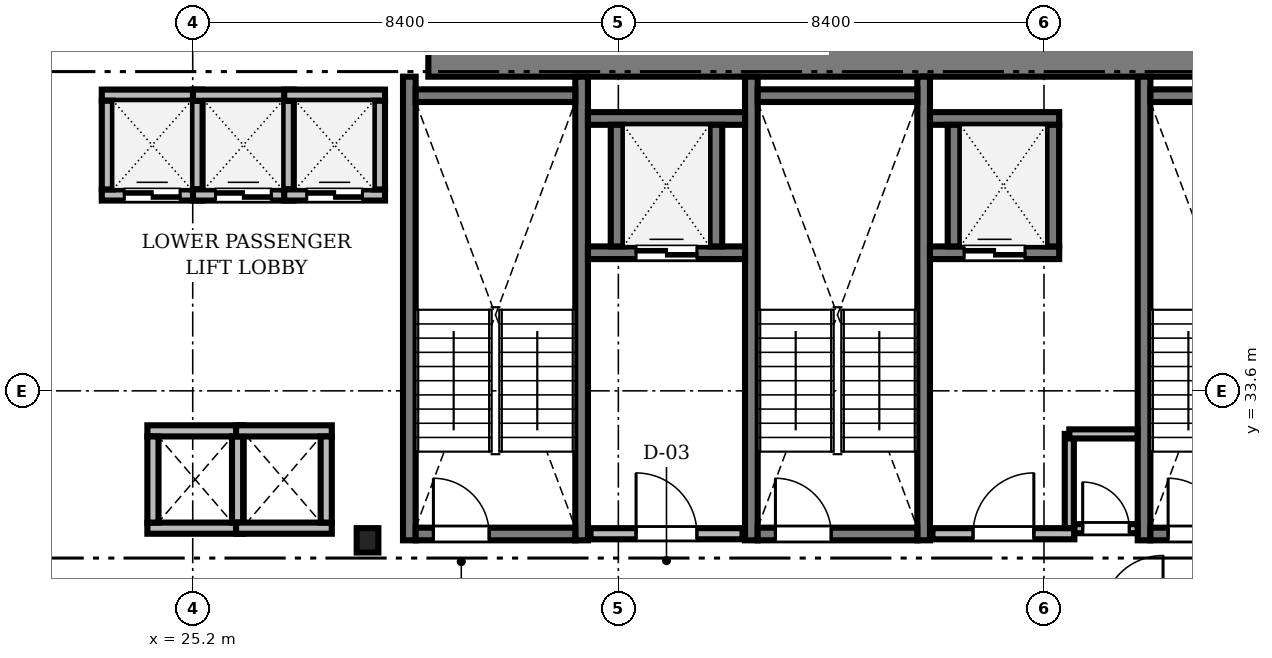
"""IFC4 building model, lengths in metres.
Left out: names, types, materials, properties, quantities, classifications, styles, units other than length and angle.
Written with IfcOpenShell. Run it as: python <this file> out.ifc"""

import sys

from ifc_helpers import new_model, si_unit, direction, frame, frame_2d, origin, origin_2d, place, context, subcontext, project, spatial, rectangle, i_section, extrude, source, transform, mapped, element, fill, save


model = new_model("IFC4")
c1 = context("Model", 3, precision=1e-05, world=origin(), true_north=direction((0.0, 1.0)))
c2 = subcontext(c1, "Body", "Model", "MODEL_VIEW")
j1 = project(units=[si_unit("LENGTHUNIT", "METRE"), si_unit("PLANEANGLEUNIT", "RADIAN")], contexts=[c1])
p1 = place(None, origin())
s1 = spatial("IfcSite", under=j1, at=p1, CompositionType="ELEMENT")
p2 = place(p1, origin())
s2 = spatial("IfcBuilding", under=s1, at=p2, CompositionType="ELEMENT")
p3 = place(p2, frame((0.0, 0.0, 34.9)))
s3 = spatial("IfcBuildingStorey", under=s2, at=p3, CompositionType="ELEMENT", Elevation=34.9)
m1 = source(origin(), c2, "Body", "SweptSolid", [
    extrude(rectangle(XDim=17.52, YDim=1.0, at=frame_2d((8.76, 0.0))), origin(), (0.0, 0.0, 1.0), 3.41),
])
p4 = place(p3, frame((29.85, 40.3, 0.0), z_axis=(0.0, 0.0, 1.0), x_axis=(1.0, 0.0, 0.0)))
e1 = element("IfcWall", 1, at=p4, inside=s3, PredefinedType="SHEAR", context=c2, shape_type="MappedRepresentation", body=[
    mapped(m1, transform((0.0, 0.0, 0.0), scale=1.0)),
])
m2 = source(origin(), c2, "Body", "SweptSolid", [
    extrude(i_section(OverallWidth=0.428, OverallDepth=0.481, WebThickness=0.04, FlangeThickness=0.063, FilletRadius=0.015, at=origin_2d()), origin(), (0.0, 0.0, 1.0), 3.41),
])
p5 = place(p3, frame((28.65, 30.65, 0.0), z_axis=(0.0, 0.0, 1.0), x_axis=(1.0, 0.0, 0.0)))
e2 = element("IfcColumn", 2, at=p5, inside=s3, PredefinedType="COLUMN", context=c2, shape_type="MappedRepresentation", body=[
    mapped(m2, transform((0.0, 0.0, 0.0), scale=1.0)),
])
m3 = source(origin(), c2, "Body", "SweptSolid", [
    extrude(rectangle(XDim=9.15, YDim=0.25, at=frame_2d((4.575, 0.0))), origin(), (0.0, 0.0, 1.0), 3.45),
])
for number, where, z_axis, x_axis in (
    (3, (29.475, 30.65, 0.0), (0.0, 0.0, 1.0), (0.0, 1.0, 0.0)),
    (4, (32.875, 30.65, 0.0), (0.0, 0.0, 1.0), (0.0, 1.0, 0.0)),
):
    element("IfcWall", number, at=place(p3, frame(where, z_axis=z_axis, x_axis=x_axis)), inside=s3, PredefinedType="SOLIDWALL", context=c2, shape_type="MappedRepresentation", body=[
        mapped(m3, transform((0.0, 0.0, 0.0), scale=1.0)),
    ])
m4 = source(origin(), c2, "Body", "SweptSolid", [
    extrude(rectangle(XDim=3.15, YDim=0.25, at=frame_2d((1.575, 0.0))), origin(), (0.0, 0.0, 1.0), 3.45),
])
p6 = place(p3, frame((29.6, 39.425, 0.0), z_axis=(0.0, 0.0, 1.0), x_axis=(1.0, 0.0, 0.0)))
e5 = element("IfcWall", 5, at=p6, inside=s3, PredefinedType="SOLIDWALL", context=c2, shape_type="MappedRepresentation", body=[
    mapped(m4, transform((0.0, 0.0, 0.0), scale=1.0)),
])
p7 = place(p3, frame((29.6, 30.775, 0.0), z_axis=(0.0, 0.0, 1.0), x_axis=(1.0, 0.0, 0.0)))
e6 = element("IfcWall", 6, at=p7, inside=s3, PredefinedType="SOLIDWALL", context=c2, shape_type="MappedRepresentation", body=[
    mapped(m4, transform((0.0, 0.0, 0.0), scale=1.0)),
])
m5 = source(origin(), c2, "Body", "SweptSolid", [
    extrude(rectangle(XDim=1.1, YDim=2.2, at=frame_2d((0.55, 1.1))), frame((0.0, 0.135, 0.0), z_axis=(0.0, -1.0, 0.0), x_axis=(1.0, 0.0, 0.0)), (0.0, 0.0, 1.0), 0.27),
])
p8 = place(p7, frame((0.35, 0.0, 0.0)))
e7 = element("IfcOpeningElement", 7, at=p8, cuts=e6, PredefinedType="OPENING", context=c2, shape_type="MappedRepresentation", body=[
    mapped(m5, transform((0.0, 0.0, 0.0), scale=1.0)),
])
for number, where, z_axis, x_axis in (
    (8, (36.225, 30.65, 0.0), (0.0, 0.0, 1.0), (0.0, 1.0, 0.0)),
    (9, (39.625, 30.65, 0.0), (0.0, 0.0, 1.0), (0.0, 1.0, 0.0)),
):
    element("IfcWall", number, at=place(p3, frame(where, z_axis=z_axis, x_axis=x_axis)), inside=s3, PredefinedType="SOLIDWALL", context=c2, shape_type="MappedRepresentation", body=[
        mapped(m3, transform((0.0, 0.0, 0.0), scale=1.0)),
    ])
p9 = place(p3, frame((36.35, 39.425, 0.0), z_axis=(0.0, 0.0, 1.0), x_axis=(1.0, 0.0, 0.0)))
e10 = element("IfcWall", 10, at=p9, inside=s3, PredefinedType="SOLIDWALL", context=c2, shape_type="MappedRepresentation", body=[
    mapped(m4, transform((0.0, 0.0, 0.0), scale=1.0)),
])
p10 = place(p3, frame((36.35, 30.775, 0.0), z_axis=(0.0, 0.0, 1.0), x_axis=(1.0, 0.0, 0.0)))
e11 = element("IfcWall", 11, at=p10, inside=s3, PredefinedType="SOLIDWALL", context=c2, shape_type="MappedRepresentation", body=[
    mapped(m4, transform((0.0, 0.0, 0.0), scale=1.0)),
])
p11 = place(p10, frame((0.35, 0.0, 0.0)))
e12 = element("IfcOpeningElement", 12, at=p11, cuts=e11, PredefinedType="OPENING", context=c2, shape_type="MappedRepresentation", body=[
    mapped(m5, transform((0.0, 0.0, 0.0), scale=1.0)),
])
p12 = place(p3, frame((43.975, 30.65, 0.0), z_axis=(0.0, 0.0, 1.0), x_axis=(0.0, 1.0, 0.0)))
e13 = element("IfcWall", 13, at=p12, inside=s3, PredefinedType="SOLIDWALL", context=c2, shape_type="MappedRepresentation", body=[
    mapped(m3, transform((0.0, 0.0, 0.0), scale=1.0)),
])
p13 = place(p3, frame((44.1, 39.425, 0.0), z_axis=(0.0, 0.0, 1.0), x_axis=(1.0, 0.0, 0.0)))
e14 = element("IfcWall", 14, at=p13, inside=s3, PredefinedType="SOLIDWALL", context=c2, shape_type="MappedRepresentation", body=[
    mapped(m4, transform((0.0, 0.0, 0.0), scale=1.0)),
])
p14 = place(p3, frame((44.1, 30.775, 0.0), z_axis=(0.0, 0.0, 1.0), x_axis=(1.0, 0.0, 0.0)))
e15 = element("IfcWall", 15, at=p14, inside=s3, PredefinedType="SOLIDWALL", context=c2, shape_type="MappedRepresentation", body=[
    mapped(m4, transform((0.0, 0.0, 0.0), scale=1.0)),
])
p15 = place(p14, frame((0.35, 0.0, 0.0)))
e16 = element("IfcOpeningElement", 16, at=p15, cuts=e15, PredefinedType="OPENING", context=c2, shape_type="MappedRepresentation", body=[
    mapped(m5, transform((0.0, 0.0, 0.0), scale=1.0)),
])
m6 = source(origin(), c2, "Body", "SweptSolid", [
    extrude(rectangle(XDim=3.0, YDim=0.22, at=frame_2d((1.5, 0.0))), origin(), (0.0, 0.0, 1.0), 3.41),
])
p16 = place(p3, frame((33.05, 30.78, 0.0), z_axis=(0.0, 0.0, 1.0), x_axis=(1.0, 0.0, 0.0)))
e17 = element("IfcWall", 17, at=p16, inside=s3, PredefinedType="SOLIDWALL", context=c2, shape_type="MappedRepresentation", body=[
    mapped(m6, transform((0.0, 0.0, 0.0), scale=1.0)),
])
m7 = source(origin(), c2, "Body", "SweptSolid", [
    extrude(rectangle(XDim=1.2, YDim=2.2, at=frame_2d((0.6, 1.1))), frame((0.0, 0.12, 0.0), z_axis=(0.0, -1.0, 0.0), x_axis=(1.0, 0.0, 0.0)), (0.0, 0.0, 1.0), 0.24),
])
p17 = place(p16, frame((0.9, 0.0, 0.0)))
e18 = element("IfcOpeningElement", 18, at=p17, cuts=e17, PredefinedType="OPENING", context=c2, shape_type="MappedRepresentation", body=[
    mapped(m7, transform((0.0, 0.0, 0.0), scale=1.0)),
])
m8 = source(origin(), c2, "Body", "SweptSolid", [
    extrude(rectangle(XDim=2.8, YDim=0.22, at=frame_2d((1.4, 0.0))), origin(), (0.0, 0.0, 1.0), 3.41),
])
p18 = place(p3, frame((39.8, 30.78, 0.0), z_axis=(0.0, 0.0, 1.0), x_axis=(1.0, 0.0, 0.0)))
e19 = element("IfcWall", 19, at=p18, inside=s3, PredefinedType="SOLIDWALL", context=c2, shape_type="MappedRepresentation", body=[
    mapped(m8, transform((0.0, 0.0, 0.0), scale=1.0)),
])
p19 = place(p18, frame((0.8, 0.0, 0.0)))
e20 = element("IfcOpeningElement", 20, at=p19, cuts=e19, PredefinedType="OPENING", context=c2, shape_type="MappedRepresentation", body=[
    mapped(m7, transform((0.0, 0.0, 0.0), scale=1.0)),
])
m9 = source(origin(), c2, "Body", "SweptSolid", [
    extrude(rectangle(XDim=1.99, YDim=0.22, at=frame_2d((0.995, 0.0))), origin(), (0.0, 0.0, 1.0), 3.41),
])
p20 = place(p3, frame((23.405, 37.465, 0.0), z_axis=(0.0, 0.0, 1.0), x_axis=(1.0, 0.0, 0.0)))
e21 = element("IfcWall", 21, at=p20, inside=s3, PredefinedType="SOLIDWALL", context=c2, shape_type="MappedRepresentation", body=[
    mapped(m9, transform((0.0, 0.0, 0.0), scale=1.0)),
])
m10 = source(origin(), c2, "Body", "SweptSolid", [
    extrude(rectangle(XDim=1.1, YDim=2.2, at=frame_2d((0.55, 1.1))), frame((0.0, 0.12, 0.0), z_axis=(0.0, -1.0, 0.0), x_axis=(1.0, 0.0, 0.0)), (0.0, 0.0, 1.0), 0.24),
])
p21 = place(p20, frame((0.445, 0.0, 0.0)))
e22 = element("IfcOpeningElement", 22, at=p21, cuts=e21, PredefinedType="OPENING", context=c2, shape_type="MappedRepresentation", body=[
    mapped(m10, transform((0.0, 0.0, 0.0), scale=1.0)),
])
p22 = place(p3, frame((23.405, 39.435, 0.0), z_axis=(0.0, 0.0, 1.0), x_axis=(1.0, 0.0, 0.0)))
e23 = element("IfcWall", 23, at=p22, inside=s3, PredefinedType="SOLIDWALL", context=c2, shape_type="MappedRepresentation", body=[
    mapped(m9, transform((0.0, 0.0, 0.0), scale=1.0)),
])
m11 = source(origin(), c2, "Body", "SweptSolid", [
    extrude(rectangle(XDim=1.75, YDim=0.22, at=frame_2d((0.875, 0.0))), origin(), (0.0, 0.0, 1.0), 3.41),
])
for number, where, z_axis, x_axis in (
    (24, (23.515, 37.575, 0.0), (0.0, 0.0, 1.0), (0.0, 1.0, 0.0)),
    (25, (25.285, 37.575, 0.0), (0.0, 0.0, 1.0), (0.0, 1.0, 0.0)),
):
    element("IfcWall", number, at=place(p3, frame(where, z_axis=z_axis, x_axis=x_axis)), inside=s3, PredefinedType="SOLIDWALL", context=c2, shape_type="MappedRepresentation", body=[
        mapped(m11, transform((0.0, 0.0, 0.0), scale=1.0)),
    ])
p23 = place(p3, frame((25.205, 37.465, 0.0), z_axis=(0.0, 0.0, 1.0), x_axis=(1.0, 0.0, 0.0)))
e26 = element("IfcWall", 26, at=p23, inside=s3, PredefinedType="SOLIDWALL", context=c2, shape_type="MappedRepresentation", body=[
    mapped(m9, transform((0.0, 0.0, 0.0), scale=1.0)),
])
p24 = place(p23, frame((0.445, 0.0, 0.0)))
e27 = element("IfcOpeningElement", 27, at=p24, cuts=e26, PredefinedType="OPENING", context=c2, shape_type="MappedRepresentation", body=[
    mapped(m10, transform((0.0, 0.0, 0.0), scale=1.0)),
])
p25 = place(p3, frame((25.205, 39.435, 0.0), z_axis=(0.0, 0.0, 1.0), x_axis=(1.0, 0.0, 0.0)))
e28 = element("IfcWall", 28, at=p25, inside=s3, PredefinedType="SOLIDWALL", context=c2, shape_type="MappedRepresentation", body=[
    mapped(m9, transform((0.0, 0.0, 0.0), scale=1.0)),
])
p26 = place(p3, frame((27.085, 37.575, 0.0), z_axis=(0.0, 0.0, 1.0), x_axis=(0.0, 1.0, 0.0)))
e29 = element("IfcWall", 29, at=p26, inside=s3, PredefinedType="SOLIDWALL", context=c2, shape_type="MappedRepresentation", body=[
    mapped(m11, transform((0.0, 0.0, 0.0), scale=1.0)),
])
m12 = source(origin(), c2, "Body", "SweptSolid", [
    extrude(rectangle(XDim=1.99, YDim=0.22, at=frame_2d((0.995, 0.0))), origin(), (0.0, 0.0, 1.0), 3.41),
])
p27 = place(p3, frame((27.005, 37.465, 0.0), z_axis=(0.0, 0.0, 1.0), x_axis=(1.0, 0.0, 0.0)))
e30 = element("IfcWall", 30, at=p27, inside=s3, PredefinedType="SOLIDWALL", context=c2, shape_type="MappedRepresentation", body=[
    mapped(m12, transform((0.0, 0.0, 0.0), scale=1.0)),
])
p28 = place(p27, frame((0.445, 0.0, 0.0)))
e31 = element("IfcOpeningElement", 31, at=p28, cuts=e30, PredefinedType="OPENING", context=c2, shape_type="MappedRepresentation", body=[
    mapped(m10, transform((0.0, 0.0, 0.0), scale=1.0)),
])
p29 = place(p3, frame((27.005, 39.435, 0.0), z_axis=(0.0, 0.0, 1.0), x_axis=(1.0, 0.0, 0.0)))
e32 = element("IfcWall", 32, at=p29, inside=s3, PredefinedType="SOLIDWALL", context=c2, shape_type="MappedRepresentation", body=[
    mapped(m12, transform((0.0, 0.0, 0.0), scale=1.0)),
])
p30 = place(p3, frame((28.885, 37.575, 0.0), z_axis=(0.0, 0.0, 1.0), x_axis=(0.0, 1.0, 0.0)))
e33 = element("IfcWall", 33, at=p30, inside=s3, PredefinedType="SOLIDWALL", context=c2, shape_type="MappedRepresentation", body=[
    mapped(m11, transform((0.0, 0.0, 0.0), scale=1.0)),
])
m13 = source(origin(), c2, "Body", "SweptSolid", [
    extrude(rectangle(XDim=3.1, YDim=0.25, at=frame_2d((1.55, 0.0))), origin(), (0.0, 0.0, 1.0), 3.41),
])
p31 = place(p3, frame((33.0, 36.325, 0.0), z_axis=(0.0, 0.0, 1.0), x_axis=(1.0, 0.0, 0.0)))
e34 = element("IfcWall", 34, at=p31, inside=s3, PredefinedType="SOLIDWALL", context=c2, shape_type="MappedRepresentation", body=[
    mapped(m13, transform((0.0, 0.0, 0.0), scale=1.0)),
])
m14 = source(origin(), c2, "Body", "SweptSolid", [
    extrude(rectangle(XDim=1.2, YDim=2.25, at=frame_2d((0.6, 1.125))), frame((0.0, 0.135, 0.0), z_axis=(0.0, -1.0, 0.0), x_axis=(1.0, 0.0, 0.0)), (0.0, 0.0, 1.0), 0.27),
])
p32 = place(p31, frame((0.95, 0.0, 0.0)))
e35 = element("IfcOpeningElement", 35, at=p32, cuts=e34, PredefinedType="OPENING", context=c2, shape_type="MappedRepresentation", body=[
    mapped(m14, transform((0.0, 0.0, 0.0), scale=1.0)),
])
p33 = place(p3, frame((33.0, 38.975, 0.0), z_axis=(0.0, 0.0, 1.0), x_axis=(1.0, 0.0, 0.0)))
e36 = element("IfcWall", 36, at=p33, inside=s3, PredefinedType="SOLIDWALL", context=c2, shape_type="MappedRepresentation", body=[
    mapped(m13, transform((0.0, 0.0, 0.0), scale=1.0)),
])
m15 = source(origin(), c2, "Body", "SweptSolid", [
    extrude(rectangle(XDim=2.4, YDim=0.25, at=frame_2d((1.2, 0.0))), origin(), (0.0, 0.0, 1.0), 3.41),
])
for number, where, z_axis, x_axis in (
    (37, (33.575, 36.45, 0.0), (0.0, 0.0, 1.0), (0.0, 1.0, 0.0)),
    (38, (35.525, 36.45, 0.0), (0.0, 0.0, 1.0), (0.0, 1.0, 0.0)),
):
    element("IfcWall", number, at=place(p3, frame(where, z_axis=z_axis, x_axis=x_axis)), inside=s3, PredefinedType="SOLIDWALL", context=c2, shape_type="MappedRepresentation", body=[
        mapped(m15, transform((0.0, 0.0, 0.0), scale=1.0)),
    ])
m16 = source(origin(), c2, "Body", "SweptSolid", [
    extrude(rectangle(XDim=2.55, YDim=0.25, at=frame_2d((1.275, 0.0))), origin(), (0.0, 0.0, 1.0), 3.41),
])
p34 = place(p3, frame((39.75, 36.325, 0.0), z_axis=(0.0, 0.0, 1.0), x_axis=(1.0, 0.0, 0.0)))
e39 = element("IfcWall", 39, at=p34, inside=s3, PredefinedType="SOLIDWALL", context=c2, shape_type="MappedRepresentation", body=[
    mapped(m16, transform((0.0, 0.0, 0.0), scale=1.0)),
])
p35 = place(p34, frame((0.675, 0.0, 0.0)))
e40 = element("IfcOpeningElement", 40, at=p35, cuts=e39, PredefinedType="OPENING", context=c2, shape_type="MappedRepresentation", body=[
    mapped(m14, transform((0.0, 0.0, 0.0), scale=1.0)),
])
p36 = place(p3, frame((39.75, 38.975, 0.0), z_axis=(0.0, 0.0, 1.0), x_axis=(1.0, 0.0, 0.0)))
e41 = element("IfcWall", 41, at=p36, inside=s3, PredefinedType="SOLIDWALL", context=c2, shape_type="MappedRepresentation", body=[
    mapped(m16, transform((0.0, 0.0, 0.0), scale=1.0)),
])
for number, where, z_axis, x_axis in (
    (42, (40.225, 36.45, 0.0), (0.0, 0.0, 1.0), (0.0, 1.0, 0.0)),
    (43, (42.175, 36.45, 0.0), (0.0, 0.0, 1.0), (0.0, 1.0, 0.0)),
):
    element("IfcWall", number, at=place(p3, frame(where, z_axis=z_axis, x_axis=x_axis)), inside=s3, PredefinedType="SOLIDWALL", context=c2, shape_type="MappedRepresentation", body=[
        mapped(m15, transform((0.0, 0.0, 0.0), scale=1.0)),
    ])
m17 = source(origin(), c2, "Body", "SweptSolid", [
    extrude(rectangle(XDim=1.89, YDim=0.22, at=frame_2d((0.945, 0.0))), origin(), (0.0, 0.0, 1.0), 3.41),
])
for number, where, z_axis, x_axis in (
    (44, (24.305, 30.89, 0.0), (0.0, 0.0, 1.0), (1.0, 0.0, 0.0)),
    (45, (24.305, 32.81, 0.0), (0.0, 0.0, 1.0), (1.0, 0.0, 0.0)),
):
    element("IfcWall", number, at=place(p3, frame(where, z_axis=z_axis, x_axis=x_axis)), inside=s3, PredefinedType="SOLIDWALL", context=c2, shape_type="MappedRepresentation", body=[
        mapped(m17, transform((0.0, 0.0, 0.0), scale=1.0)),
    ])
m18 = source(origin(), c2, "Body", "SweptSolid", [
    extrude(rectangle(XDim=1.7, YDim=0.22, at=frame_2d((0.85, 0.0))), origin(), (0.0, 0.0, 1.0), 3.41),
])
for number, where, z_axis, x_axis in (
    (46, (24.415, 31.0, 0.0), (0.0, 0.0, 1.0), (0.0, 1.0, 0.0)),
    (47, (26.085, 31.0, 0.0), (0.0, 0.0, 1.0), (0.0, 1.0, 0.0)),
):
    element("IfcWall", number, at=place(p3, frame(where, z_axis=z_axis, x_axis=x_axis)), inside=s3, PredefinedType="SOLIDWALL", context=c2, shape_type="MappedRepresentation", body=[
        mapped(m18, transform((0.0, 0.0, 0.0), scale=1.0)),
    ])
for number, where, z_axis, x_axis in (
    (48, (26.055, 30.89, 0.0), (0.0, 0.0, 1.0), (1.0, 0.0, 0.0)),
    (49, (26.055, 32.81, 0.0), (0.0, 0.0, 1.0), (1.0, 0.0, 0.0)),
):
    element("IfcWall", number, at=place(p3, frame(where, z_axis=z_axis, x_axis=x_axis)), inside=s3, PredefinedType="SOLIDWALL", context=c2, shape_type="MappedRepresentation", body=[
        mapped(m17, transform((0.0, 0.0, 0.0), scale=1.0)),
    ])
p37 = place(p3, frame((27.835, 31.0, 0.0), z_axis=(0.0, 0.0, 1.0), x_axis=(0.0, 1.0, 0.0)))
e50 = element("IfcWall", 50, at=p37, inside=s3, PredefinedType="SOLIDWALL", context=c2, shape_type="MappedRepresentation", body=[
    mapped(m18, transform((0.0, 0.0, 0.0), scale=1.0)),
])
m19 = source(origin(), c2, "Body", "SweptSolid", [
    extrude(rectangle(XDim=1.248, YDim=0.18, at=frame_2d((0.624, 0.0))), origin(), (0.0, 0.0, 1.0), 3.41),
])
p38 = place(p3, frame((42.6, 30.88, 0.0), z_axis=(0.0, 0.0, 1.0), x_axis=(1.0, 0.0, 0.0)))
e51 = element("IfcWall", 51, at=p38, inside=s3, PredefinedType="PARTITIONING", context=c2, shape_type="MappedRepresentation", body=[
    mapped(m19, transform((0.0, 0.0, 0.0), scale=1.0)),
])
m20 = source(origin(), c2, "Body", "SweptSolid", [
    extrude(rectangle(XDim=0.92, YDim=2.1, at=frame_2d((0.46, 1.05))), frame((0.0, 0.1, 0.0), z_axis=(0.0, -1.0, 0.0), x_axis=(1.0, 0.0, 0.0)), (0.0, 0.0, 1.0), 0.2),
])
p39 = place(p38, frame((0.164, 0.0, 0.0)))
e52 = element("IfcOpeningElement", 52, at=p39, cuts=e51, PredefinedType="OPENING", context=c2, shape_type="MappedRepresentation", body=[
    mapped(m20, transform((0.0, 0.0, 0.0), scale=1.0)),
])
m21 = source(origin(), c2, "Body", "SweptSolid", [
    extrude(rectangle(XDim=1.858, YDim=0.18, at=frame_2d((0.929, 0.0))), origin(), (0.0, 0.0, 1.0), 3.41),
])
p40 = place(p3, frame((42.5, 30.892, 0.0), z_axis=(0.0, 0.0, 1.0), x_axis=(0.0, 1.0, 0.0)))
e53 = element("IfcWall", 53, at=p40, inside=s3, PredefinedType="PARTITIONING", context=c2, shape_type="MappedRepresentation", body=[
    mapped(m21, transform((0.0, 0.0, 0.0), scale=1.0)),
])
m22 = source(origin(), c2, "Body", "SweptSolid", [
    extrude(rectangle(XDim=1.348, YDim=0.18, at=frame_2d((0.674, 0.0))), origin(), (0.0, 0.0, 1.0), 3.41),
])
p41 = place(p3, frame((42.5, 32.75, 0.0), z_axis=(0.0, 0.0, 1.0), x_axis=(1.0, 0.0, 0.0)))
e54 = element("IfcWall", 54, at=p41, inside=s3, PredefinedType="PARTITIONING", context=c2, shape_type="MappedRepresentation", body=[
    mapped(m22, transform((0.0, 0.0, 0.0), scale=1.0)),
])
m23 = source(origin(), c2, "Body", "SweptSolid", [
    extrude(rectangle(XDim=1.1, YDim=2.2, at=frame_2d((0.55, 1.1))), frame((0.0, 0.025, 0.0), z_axis=(0.0, -1.0, 0.0), x_axis=(1.0, 0.0, 0.0)), (0.0, 0.0, 1.0), 0.05),
])
p42 = place(p8, origin())
e55 = element("IfcDoor", 55, at=p42, inside=s3, OperationType="SINGLE_SWING_LEFT", PredefinedType="DOOR", context=c2, shape_type="MappedRepresentation", body=[
    mapped(m23, transform((0.0, 0.0, 0.0), scale=1.0)),
])
fill(e7, e55)
p43 = place(p11, origin())
e56 = element("IfcDoor", 56, at=p43, inside=s3, OperationType="SINGLE_SWING_LEFT", PredefinedType="DOOR", context=c2, shape_type="MappedRepresentation", body=[
    mapped(m23, transform((0.0, 0.0, 0.0), scale=1.0)),
])
fill(e12, e56)
p44 = place(p15, origin())
e57 = element("IfcDoor", 57, at=p44, inside=s3, OperationType="SINGLE_SWING_LEFT", PredefinedType="DOOR", context=c2, shape_type="MappedRepresentation", body=[
    mapped(m23, transform((0.0, 0.0, 0.0), scale=1.0)),
])
fill(e16, e57)
m24 = source(origin(), c2, "Body", "SweptSolid", [
    extrude(rectangle(XDim=1.2, YDim=2.2, at=frame_2d((0.6, 1.1))), frame((0.0, 0.025, 0.0), z_axis=(0.0, -1.0, 0.0), x_axis=(1.0, 0.0, 0.0)), (0.0, 0.0, 1.0), 0.05),
])
p45 = place(p17, origin())
e58 = element("IfcDoor", 58, at=p45, inside=s3, OperationType="SINGLE_SWING_LEFT", PredefinedType="DOOR", context=c2, shape_type="MappedRepresentation", body=[
    mapped(m24, transform((0.0, 0.0, 0.0), scale=1.0)),
])
fill(e18, e58)
p46 = place(p19, origin())
e59 = element("IfcDoor", 59, at=p46, inside=s3, OperationType="SINGLE_SWING_RIGHT", PredefinedType="DOOR", context=c2, shape_type="MappedRepresentation", body=[
    mapped(m24, transform((0.0, 0.0, 0.0), scale=1.0)),
])
fill(e20, e59)
p47 = place(p21, origin())
e60 = element("IfcDoor", 60, at=p47, inside=s3, OperationType="DOUBLE_DOOR_SLIDING", PredefinedType="DOOR", context=c2, shape_type="MappedRepresentation", body=[
    mapped(m23, transform((0.0, 0.0, 0.0), scale=1.0)),
])
fill(e22, e60)
p48 = place(p24, origin())
e61 = element("IfcDoor", 61, at=p48, inside=s3, OperationType="DOUBLE_DOOR_SLIDING", PredefinedType="DOOR", context=c2, shape_type="MappedRepresentation", body=[
    mapped(m23, transform((0.0, 0.0, 0.0), scale=1.0)),
])
fill(e27, e61)
p49 = place(p28, origin())
e62 = element("IfcDoor", 62, at=p49, inside=s3, OperationType="DOUBLE_DOOR_SLIDING", PredefinedType="DOOR", context=c2, shape_type="MappedRepresentation", body=[
    mapped(m23, transform((0.0, 0.0, 0.0), scale=1.0)),
])
fill(e31, e62)
m25 = source(origin(), c2, "Body", "SweptSolid", [
    extrude(rectangle(XDim=1.2, YDim=2.25, at=frame_2d((0.6, 1.125))), frame((0.0, 0.025, 0.0), z_axis=(0.0, -1.0, 0.0), x_axis=(1.0, 0.0, 0.0)), (0.0, 0.0, 1.0), 0.05),
])
p50 = place(p32, origin())
e63 = element("IfcDoor", 63, at=p50, inside=s3, OperationType="DOUBLE_DOOR_SLIDING", PredefinedType="DOOR", context=c2, shape_type="MappedRepresentation", body=[
    mapped(m25, transform((0.0, 0.0, 0.0), scale=1.0)),
])
fill(e35, e63)
p51 = place(p35, origin())
e64 = element("IfcDoor", 64, at=p51, inside=s3, OperationType="DOUBLE_DOOR_SLIDING", PredefinedType="DOOR", context=c2, shape_type="MappedRepresentation", body=[
    mapped(m25, transform((0.0, 0.0, 0.0), scale=1.0)),
])
fill(e40, e64)
m26 = source(origin(), c2, "Body", "SweptSolid", [
    extrude(rectangle(XDim=0.92, YDim=2.1, at=frame_2d((0.46, 1.05))), frame((0.0, 0.025, 0.0), z_axis=(0.0, -1.0, 0.0), x_axis=(1.0, 0.0, 0.0)), (0.0, 0.0, 1.0), 0.05),
])
p52 = place(p39, origin())
e65 = element("IfcDoor", 65, at=p52, inside=s3, OperationType="SINGLE_SWING_LEFT", PredefinedType="DOOR", context=c2, shape_type="MappedRepresentation", body=[
    mapped(m26, transform((0.0, 0.0, 0.0), scale=1.0)),
])
fill(e52, e65)
save(model, sys.argv[1])
